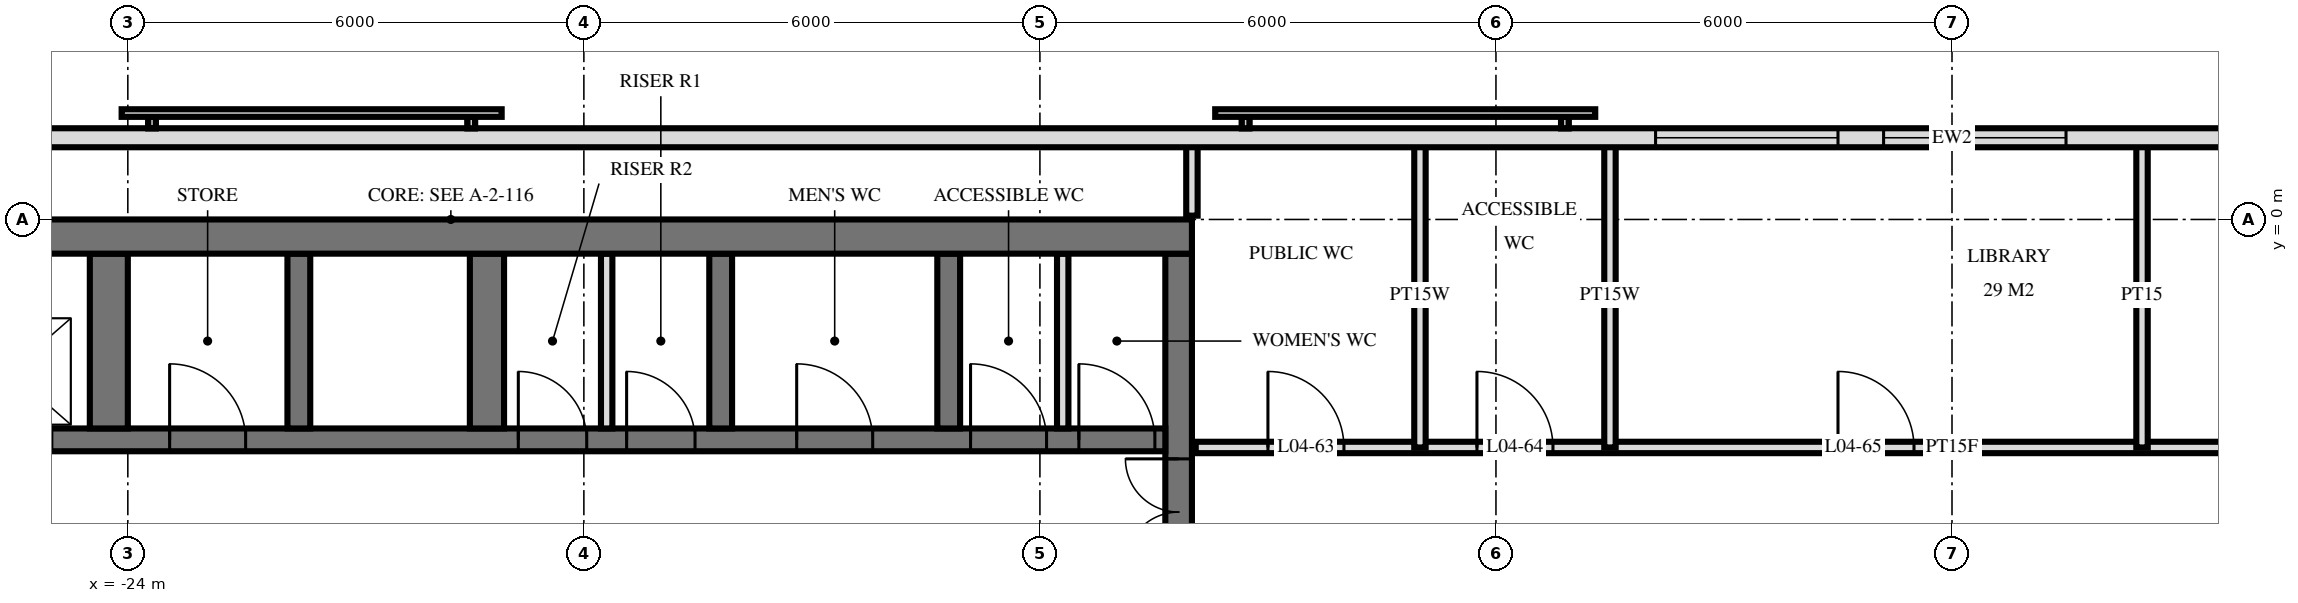
"""IFC4 building model, lengths in metres.
Left out: names, types, materials, properties, quantities, classifications, styles, units other than length and angle.
Written with IfcOpenShell. Run it as: python <this file> out.ifc"""

import sys

from ifc_helpers import new_model, si_unit, direction, frame, frame_2d, origin, place, context, subcontext, project, spatial, rectangle, extrude, element, fill, save


model = new_model("IFC4")
c1 = context("Model", 3, precision=1e-05, world=origin(), true_north=direction((0.0, 1.0)))
c2 = subcontext(c1, "Body", "Model", "MODEL_VIEW")
j1 = project(units=[si_unit("LENGTHUNIT", "METRE"), si_unit("PLANEANGLEUNIT", "RADIAN")], contexts=[c1])
p1 = place(None, origin())
s1 = spatial("IfcSite", under=j1, at=p1, CompositionType="ELEMENT")
p2 = place(p1, origin())
s2 = spatial("IfcBuilding", under=s1, at=p2, CompositionType="ELEMENT")
p3 = place(p2, frame((0.0, 0.0, 24.0)))
s3 = spatial("IfcBuildingStorey", under=s2, at=p3, CompositionType="ELEMENT", Elevation=24.0)
p4 = place(p3, frame((-29.5, -0.225, 0.0), z_axis=(0.0, 0.0, 1.0), x_axis=(1.0, 0.0, 0.0)))
e1 = element("IfcWall", 1, at=p4, inside=s3, PredefinedType="SHEAR", context=c2, shape_type="SweptSolid", body=[
    extrude(rectangle(XDim=19.5, YDim=0.45, at=frame_2d((9.75, 0.0))), origin(), (0.0, 0.0, 1.0), 3.6),
])
p5 = place(p3, frame((-10.175, -14.55, 0.0), z_axis=(0.0, 0.0, 1.0), x_axis=(0.0, 1.0, 0.0)))
e2 = element("IfcWall", 2, at=p5, inside=s3, PredefinedType="SHEAR", context=c2, shape_type="SweptSolid", body=[
    extrude(rectangle(XDim=14.1, YDim=0.35, at=frame_2d((7.05, 0.0))), origin(), (0.0, 0.0, 1.0), 3.6),
])
p6 = place(p5, frame((8.4, 0.0, 0.0)))
e3 = element("IfcOpeningElement", 3, at=p6, cuts=e2, PredefinedType="OPENING", context=c2, shape_type="SweptSolid", body=[
    extrude(rectangle(XDim=1.4, YDim=2.4, at=frame_2d((0.7, 1.2))), frame((0.0, 0.185, 0.0), z_axis=(0.0, -1.0, 0.0), x_axis=(1.0, 0.0, 0.0)), (0.0, 0.0, 1.0), 0.37),
])
p7 = place(p5, frame((10.0, 0.0, 0.0)))
e4 = element("IfcOpeningElement", 4, at=p7, cuts=e2, PredefinedType="OPENING", context=c2, shape_type="SweptSolid", body=[
    extrude(rectangle(XDim=1.4, YDim=2.4, at=frame_2d((0.7, 1.2))), frame((0.0, 0.185, 0.0), z_axis=(0.0, -1.0, 0.0), x_axis=(1.0, 0.0, 0.0)), (0.0, 0.0, 1.0), 0.37),
])
p8 = place(p5, frame((4.0, 0.0, 0.0)))
e5 = element("IfcOpeningElement", 5, at=p8, cuts=e2, PredefinedType="OPENING", context=c2, shape_type="SweptSolid", body=[
    extrude(rectangle(XDim=1.2, YDim=2.1, at=frame_2d((0.6, 1.05))), frame((0.0, 0.185, 0.0), z_axis=(0.0, -1.0, 0.0), x_axis=(1.0, 0.0, 0.0)), (0.0, 0.0, 1.0), 0.37),
])
p9 = place(p3, frame((-29.05, -2.9, 0.0), z_axis=(0.0, 0.0, 1.0), x_axis=(1.0, 0.0, 0.0)))
e6 = element("IfcWall", 6, at=p9, inside=s3, PredefinedType="SHEAR", context=c2, shape_type="SweptSolid", body=[
    extrude(rectangle(XDim=18.7, YDim=0.3, at=frame_2d((9.35, 0.0))), origin(), (0.0, 0.0, 1.0), 3.6),
])
p10 = place(p9, frame((2.95, 0.0, 0.0)))
e7 = element("IfcOpeningElement", 7, at=p10, cuts=e6, PredefinedType="OPENING", context=c2, shape_type="SweptSolid", body=[
    extrude(rectangle(XDim=1.1, YDim=2.1, at=frame_2d((0.55, 1.05))), frame((0.0, 0.16, 0.0), z_axis=(0.0, -1.0, 0.0), x_axis=(1.0, 0.0, 0.0)), (0.0, 0.0, 1.0), 0.32),
])
p11 = place(p9, frame((0.55, 0.0, 0.0)))
e8 = element("IfcOpeningElement", 8, at=p11, cuts=e6, PredefinedType="OPENING", context=c2, shape_type="SweptSolid", body=[
    extrude(rectangle(XDim=1.1, YDim=2.1, at=frame_2d((0.55, 1.05))), frame((0.0, 0.16, 0.0), z_axis=(0.0, -1.0, 0.0), x_axis=(1.0, 0.0, 0.0)), (0.0, 0.0, 1.0), 0.32),
])
p12 = place(p9, frame((11.613, 0.0, 0.0)))
e9 = element("IfcOpeningElement", 9, at=p12, cuts=e6, PredefinedType="OPENING", context=c2, shape_type="SweptSolid", body=[
    extrude(rectangle(XDim=0.9, YDim=2.1, at=frame_2d((0.45, 1.05))), frame((0.0, 0.16, 0.0), z_axis=(0.0, -1.0, 0.0), x_axis=(1.0, 0.0, 0.0)), (0.0, 0.0, 1.0), 0.32),
])
p13 = place(p9, frame((10.188, 0.0, 0.0)))
e10 = element("IfcOpeningElement", 10, at=p13, cuts=e6, PredefinedType="OPENING", context=c2, shape_type="SweptSolid", body=[
    extrude(rectangle(XDim=0.9, YDim=2.1, at=frame_2d((0.45, 1.05))), frame((0.0, 0.16, 0.0), z_axis=(0.0, -1.0, 0.0), x_axis=(1.0, 0.0, 0.0)), (0.0, 0.0, 1.0), 0.32),
])
p14 = place(p9, frame((17.562, 0.0, 0.0)))
e11 = element("IfcOpeningElement", 11, at=p14, cuts=e6, PredefinedType="OPENING", context=c2, shape_type="SweptSolid", body=[
    extrude(rectangle(XDim=1.0, YDim=2.1, at=frame_2d((0.5, 1.05))), frame((0.0, 0.16, 0.0), z_axis=(0.0, -1.0, 0.0), x_axis=(1.0, 0.0, 0.0)), (0.0, 0.0, 1.0), 0.32),
])
p15 = place(p9, frame((16.137, 0.0, 0.0)))
e12 = element("IfcOpeningElement", 12, at=p15, cuts=e6, PredefinedType="OPENING", context=c2, shape_type="SweptSolid", body=[
    extrude(rectangle(XDim=1.0, YDim=2.1, at=frame_2d((0.5, 1.05))), frame((0.0, 0.16, 0.0), z_axis=(0.0, -1.0, 0.0), x_axis=(1.0, 0.0, 0.0)), (0.0, 0.0, 1.0), 0.32),
])
p16 = place(p9, frame((13.85, 0.0, 0.0)))
e13 = element("IfcOpeningElement", 13, at=p16, cuts=e6, PredefinedType="OPENING", context=c2, shape_type="SweptSolid", body=[
    extrude(rectangle(XDim=1.0, YDim=2.1, at=frame_2d((0.5, 1.05))), frame((0.0, 0.16, 0.0), z_axis=(0.0, -1.0, 0.0), x_axis=(1.0, 0.0, 0.0)), (0.0, 0.0, 1.0), 0.32),
])
p17 = place(p9, frame((5.6, 0.0, 0.0)))
e14 = element("IfcOpeningElement", 14, at=p17, cuts=e6, PredefinedType="OPENING", context=c2, shape_type="SweptSolid", body=[
    extrude(rectangle(XDim=1.0, YDim=2.1, at=frame_2d((0.5, 1.05))), frame((0.0, 0.16, 0.0), z_axis=(0.0, -1.0, 0.0), x_axis=(1.0, 0.0, 0.0)), (0.0, 0.0, 1.0), 0.32),
])
for number, where, z_axis, x_axis in (
    (15, (-13.2, -2.75, 0.0), (0.0, 0.0, 1.0), (0.0, 1.0, 0.0)),
    (16, (-16.2, -2.75, 0.0), (0.0, 0.0, 1.0), (0.0, 1.0, 0.0)),
):
    element("IfcWall", number, at=place(p3, frame(where, z_axis=z_axis, x_axis=x_axis)), inside=s3, PredefinedType="SHEAR", context=c2, shape_type="SweptSolid", body=[
        extrude(rectangle(XDim=2.3, YDim=0.3, at=frame_2d((1.15, 0.0))), origin(), (0.0, 0.0, 1.0), 3.6),
    ])
p18 = place(p3, frame((-19.275, -2.75, 0.0), z_axis=(0.0, 0.0, 1.0), x_axis=(0.0, 1.0, 0.0)))
e17 = element("IfcWall", 17, at=p18, inside=s3, PredefinedType="SHEAR", context=c2, shape_type="SweptSolid", body=[
    extrude(rectangle(XDim=2.3, YDim=0.45, at=frame_2d((1.15, 0.0))), origin(), (0.0, 0.0, 1.0), 3.6),
])
p19 = place(p3, frame((-21.75, -2.75, 0.0), z_axis=(0.0, 0.0, 1.0), x_axis=(0.0, 1.0, 0.0)))
e18 = element("IfcWall", 18, at=p19, inside=s3, PredefinedType="SHEAR", context=c2, shape_type="SweptSolid", body=[
    extrude(rectangle(XDim=2.3, YDim=0.3, at=frame_2d((1.15, 0.0))), origin(), (0.0, 0.0, 1.0), 3.6),
])
p20 = place(p3, frame((-24.25, -2.75, 0.0), z_axis=(0.0, 0.0, 1.0), x_axis=(0.0, 1.0, 0.0)))
e19 = element("IfcWall", 19, at=p20, inside=s3, PredefinedType="SHEAR", context=c2, shape_type="SweptSolid", body=[
    extrude(rectangle(XDim=2.3, YDim=0.5, at=frame_2d((1.15, 0.0))), origin(), (0.0, 0.0, 1.0), 3.6),
])
p21 = place(p3, frame((28.775, 1.075, 0.0), z_axis=(0.0, 0.0, 1.0), x_axis=(-1.0, 0.0, 0.0)))
e20 = element("IfcWall", 20, at=p21, inside=s3, PredefinedType="SOLIDWALL", context=c2, shape_type="SweptSolid", body=[
    extrude(rectangle(XDim=57.551, YDim=0.25, at=frame_2d((28.775, 0.0))), origin(), (0.0, 0.0, 1.0), 3.32),
])
p22 = place(p21, frame((21.275, 0.0, 0.3)))
e21 = element("IfcOpeningElement", 21, at=p22, cuts=e20, PredefinedType="OPENING", context=c2, shape_type="SweptSolid", body=[
    extrude(rectangle(XDim=2.4, YDim=2.1, at=frame_2d((1.2, 1.05))), frame((0.0, 0.135, 0.0), z_axis=(0.0, -1.0, 0.0), x_axis=(1.0, 0.0, 0.0)), (0.0, 0.0, 1.0), 0.27),
])
p23 = place(p21, frame((27.275, 0.0, 0.3)))
e22 = element("IfcOpeningElement", 22, at=p23, cuts=e20, PredefinedType="OPENING", context=c2, shape_type="SweptSolid", body=[
    extrude(rectangle(XDim=2.4, YDim=2.1, at=frame_2d((1.2, 1.05))), frame((0.0, 0.135, 0.0), z_axis=(0.0, -1.0, 0.0), x_axis=(1.0, 0.0, 0.0)), (0.0, 0.0, 1.0), 0.27),
])
p24 = place(p21, frame((30.275, 0.0, 0.3)))
e23 = element("IfcOpeningElement", 23, at=p24, cuts=e20, PredefinedType="OPENING", context=c2, shape_type="SweptSolid", body=[
    extrude(rectangle(XDim=2.4, YDim=2.1, at=frame_2d((1.2, 1.05))), frame((0.0, 0.135, 0.0), z_axis=(0.0, -1.0, 0.0), x_axis=(1.0, 0.0, 0.0)), (0.0, 0.0, 1.0), 0.27),
])
for number, where, z_axis, x_axis in (
    (24, (-17.7, -2.75, 0.0), (0.0, 0.0, 1.0), (0.0, 1.0, 0.0)),
    (25, (-11.7, -2.75, 0.0), (0.0, 0.0, 1.0), (0.0, 1.0, 0.0)),
):
    element("IfcWall", number, at=place(p3, frame(where, z_axis=z_axis, x_axis=x_axis)), inside=s3, PredefinedType="PARTITIONING", context=c2, shape_type="SweptSolid", body=[
        extrude(rectangle(XDim=2.3, YDim=0.15, at=frame_2d((1.15, 0.0))), origin(), (0.0, 0.0, 1.0), 3.3),
    ])
p25 = place(p3, frame((2.5, -3.0, 0.0), z_axis=(0.0, 0.0, 1.0), x_axis=(0.0, 1.0, 0.0)))
e26 = element("IfcWall", 26, at=p25, inside=s3, PredefinedType="PARTITIONING", context=c2, shape_type="SweptSolid", body=[
    extrude(rectangle(XDim=4.02, YDim=0.15, at=frame_2d((2.01, 0.0))), origin(), (0.0, 0.0, 1.0), 3.32),
])
for number, where, z_axis, x_axis in (
    (27, (-4.5, -3.0, 0.0), (0.0, 0.0, 1.0), (0.0, 1.0, 0.0)),
    (28, (-7.0, -3.0, 0.0), (0.0, 0.0, 1.0), (0.0, 1.0, 0.0)),
):
    element("IfcWall", number, at=place(p3, frame(where, z_axis=z_axis, x_axis=x_axis)), inside=s3, PredefinedType="PLUMBINGWALL", context=c2, shape_type="SweptSolid", body=[
        extrude(rectangle(XDim=4.02, YDim=0.15, at=frame_2d((2.01, 0.0))), origin(), (0.0, 0.0, 1.0), 3.32),
    ])
p26 = place(p3, frame((-10.0, 0.05, 0.0), z_axis=(0.0, 0.0, 1.0), x_axis=(0.0, 1.0, 0.0)))
e29 = element("IfcWall", 29, at=p26, inside=s3, PredefinedType="PLUMBINGWALL", context=c2, shape_type="SweptSolid", body=[
    extrude(rectangle(XDim=0.97, YDim=0.15, at=frame_2d((0.485, 0.0))), origin(), (0.0, 0.0, 1.0), 3.32),
])
p27 = place(p3, frame((-9.95, -3.0, 0.0), z_axis=(0.0, 0.0, 1.0), x_axis=(1.0, 0.0, 0.0)))
e30 = element("IfcWall", 30, at=p27, inside=s3, PredefinedType="PARTITIONING", context=c2, shape_type="SweptSolid", body=[
    extrude(rectangle(XDim=19.9, YDim=0.15, at=frame_2d((9.95, 0.0))), origin(), (0.0, 0.0, 1.0), 3.32),
])
p28 = place(p27, frame((0.95, 0.0, 0.0)))
e31 = element("IfcOpeningElement", 31, at=p28, cuts=e30, PredefinedType="OPENING", context=c2, shape_type="SweptSolid", body=[
    extrude(rectangle(XDim=1.0, YDim=2.1, at=frame_2d((0.5, 1.05))), frame((0.0, 0.085, 0.0), z_axis=(0.0, -1.0, 0.0), x_axis=(1.0, 0.0, 0.0)), (0.0, 0.0, 1.0), 0.17),
])
p29 = place(p27, frame((3.7, 0.0, 0.0)))
e32 = element("IfcOpeningElement", 32, at=p29, cuts=e30, PredefinedType="OPENING", context=c2, shape_type="SweptSolid", body=[
    extrude(rectangle(XDim=1.0, YDim=2.1, at=frame_2d((0.5, 1.05))), frame((0.0, 0.085, 0.0), z_axis=(0.0, -1.0, 0.0), x_axis=(1.0, 0.0, 0.0)), (0.0, 0.0, 1.0), 0.17),
])
p30 = place(p27, frame((8.45, 0.0, 0.0)))
e33 = element("IfcOpeningElement", 33, at=p30, cuts=e30, PredefinedType="OPENING", context=c2, shape_type="SweptSolid", body=[
    extrude(rectangle(XDim=1.0, YDim=2.1, at=frame_2d((0.5, 1.05))), frame((0.0, 0.085, 0.0), z_axis=(0.0, -1.0, 0.0), x_axis=(1.0, 0.0, 0.0)), (0.0, 0.0, 1.0), 0.17),
])
p31 = place(p27, frame((15.7, 0.0, 0.0)))
e34 = element("IfcOpeningElement", 34, at=p31, cuts=e30, PredefinedType="OPENING", context=c2, shape_type="SweptSolid", body=[
    extrude(rectangle(XDim=1.0, YDim=2.1, at=frame_2d((0.5, 1.05))), frame((0.0, 0.085, 0.0), z_axis=(0.0, -1.0, 0.0), x_axis=(1.0, 0.0, 0.0)), (0.0, 0.0, 1.0), 0.17),
])
p32 = place(p23, origin())
e35 = element("IfcWindow", 35, at=p32, inside=s3, PartitioningType="SINGLE_PANEL", PredefinedType="WINDOW", context=c2, shape_type="SweptSolid", body=[
    extrude(rectangle(XDim=2.4, YDim=2.1, at=frame_2d((1.2, 1.05))), frame((0.0, 0.03, 0.0), z_axis=(0.0, -1.0, 0.0), x_axis=(1.0, 0.0, 0.0)), (0.0, 0.0, 1.0), 0.06),
])
fill(e22, e35)
p33 = place(p24, origin())
e36 = element("IfcWindow", 36, at=p33, inside=s3, PartitioningType="SINGLE_PANEL", PredefinedType="WINDOW", context=c2, shape_type="SweptSolid", body=[
    extrude(rectangle(XDim=2.4, YDim=2.1, at=frame_2d((1.2, 1.05))), frame((0.0, 0.03, 0.0), z_axis=(0.0, -1.0, 0.0), x_axis=(1.0, 0.0, 0.0)), (0.0, 0.0, 1.0), 0.06),
])
fill(e23, e36)
p34 = place(p7, origin())
e37 = element("IfcDoor", 37, at=p34, inside=s3, OperationType="DOUBLE_DOOR_SINGLE_SWING", PredefinedType="DOOR", context=c2, shape_type="SweptSolid", body=[
    extrude(rectangle(XDim=1.4, YDim=2.4, at=frame_2d((0.7, 1.2))), frame((0.0, 0.025, 0.0), z_axis=(0.0, -1.0, 0.0), x_axis=(1.0, 0.0, 0.0)), (0.0, 0.0, 1.0), 0.05),
])
fill(e4, e37)
p35 = place(p12, origin())
e38 = element("IfcDoor", 38, at=p35, inside=s3, OperationType="SINGLE_SWING_RIGHT", PredefinedType="DOOR", context=c2, shape_type="SweptSolid", body=[
    extrude(rectangle(XDim=0.9, YDim=2.1, at=frame_2d((0.45, 1.05))), frame((0.0, 0.025, 0.0), z_axis=(0.0, -1.0, 0.0), x_axis=(1.0, 0.0, 0.0)), (0.0, 0.0, 1.0), 0.05),
])
fill(e9, e38)
p36 = place(p13, origin())
e39 = element("IfcDoor", 39, at=p36, inside=s3, OperationType="SINGLE_SWING_RIGHT", PredefinedType="DOOR", context=c2, shape_type="SweptSolid", body=[
    extrude(rectangle(XDim=0.9, YDim=2.1, at=frame_2d((0.45, 1.05))), frame((0.0, 0.025, 0.0), z_axis=(0.0, -1.0, 0.0), x_axis=(1.0, 0.0, 0.0)), (0.0, 0.0, 1.0), 0.05),
])
fill(e10, e39)
p37 = place(p14, origin())
e40 = element("IfcDoor", 40, at=p37, inside=s3, OperationType="SINGLE_SWING_RIGHT", PredefinedType="DOOR", context=c2, shape_type="SweptSolid", body=[
    extrude(rectangle(XDim=1.0, YDim=2.1, at=frame_2d((0.5, 1.05))), frame((0.0, 0.025, 0.0), z_axis=(0.0, -1.0, 0.0), x_axis=(1.0, 0.0, 0.0)), (0.0, 0.0, 1.0), 0.05),
])
fill(e11, e40)
p38 = place(p15, origin())
e41 = element("IfcDoor", 41, at=p38, inside=s3, OperationType="SINGLE_SWING_RIGHT", PredefinedType="DOOR", context=c2, shape_type="SweptSolid", body=[
    extrude(rectangle(XDim=1.0, YDim=2.1, at=frame_2d((0.5, 1.05))), frame((0.0, 0.025, 0.0), z_axis=(0.0, -1.0, 0.0), x_axis=(1.0, 0.0, 0.0)), (0.0, 0.0, 1.0), 0.05),
])
fill(e12, e41)
p39 = place(p16, origin())
e42 = element("IfcDoor", 42, at=p39, inside=s3, OperationType="SINGLE_SWING_RIGHT", PredefinedType="DOOR", context=c2, shape_type="SweptSolid", body=[
    extrude(rectangle(XDim=1.0, YDim=2.1, at=frame_2d((0.5, 1.05))), frame((0.0, 0.025, 0.0), z_axis=(0.0, -1.0, 0.0), x_axis=(1.0, 0.0, 0.0)), (0.0, 0.0, 1.0), 0.05),
])
fill(e13, e42)
p40 = place(p17, origin())
e43 = element("IfcDoor", 43, at=p40, inside=s3, OperationType="SINGLE_SWING_RIGHT", PredefinedType="DOOR", context=c2, shape_type="SweptSolid", body=[
    extrude(rectangle(XDim=1.0, YDim=2.1, at=frame_2d((0.5, 1.05))), frame((0.0, 0.025, 0.0), z_axis=(0.0, -1.0, 0.0), x_axis=(1.0, 0.0, 0.0)), (0.0, 0.0, 1.0), 0.05),
])
fill(e14, e43)
p41 = place(p28, origin())
e44 = element("IfcDoor", 44, at=p41, inside=s3, OperationType="SINGLE_SWING_RIGHT", PredefinedType="DOOR", context=c2, shape_type="SweptSolid", body=[
    extrude(rectangle(XDim=1.0, YDim=2.1, at=frame_2d((0.5, 1.05))), frame((0.0, 0.025, 0.0), z_axis=(0.0, -1.0, 0.0), x_axis=(1.0, 0.0, 0.0)), (0.0, 0.0, 1.0), 0.05),
])
fill(e31, e44)
p42 = place(p29, origin())
e45 = element("IfcDoor", 45, at=p42, inside=s3, OperationType="SINGLE_SWING_RIGHT", PredefinedType="DOOR", context=c2, shape_type="SweptSolid", body=[
    extrude(rectangle(XDim=1.0, YDim=2.1, at=frame_2d((0.5, 1.05))), frame((0.0, 0.025, 0.0), z_axis=(0.0, -1.0, 0.0), x_axis=(1.0, 0.0, 0.0)), (0.0, 0.0, 1.0), 0.05),
])
fill(e32, e45)
p43 = place(p30, origin())
e46 = element("IfcDoor", 46, at=p43, inside=s3, OperationType="SINGLE_SWING_RIGHT", PredefinedType="DOOR", context=c2, shape_type="SweptSolid", body=[
    extrude(rectangle(XDim=1.0, YDim=2.1, at=frame_2d((0.5, 1.05))), frame((0.0, 0.025, 0.0), z_axis=(0.0, -1.0, 0.0), x_axis=(1.0, 0.0, 0.0)), (0.0, 0.0, 1.0), 0.05),
])
fill(e33, e46)
save(model, sys.argv[1])
